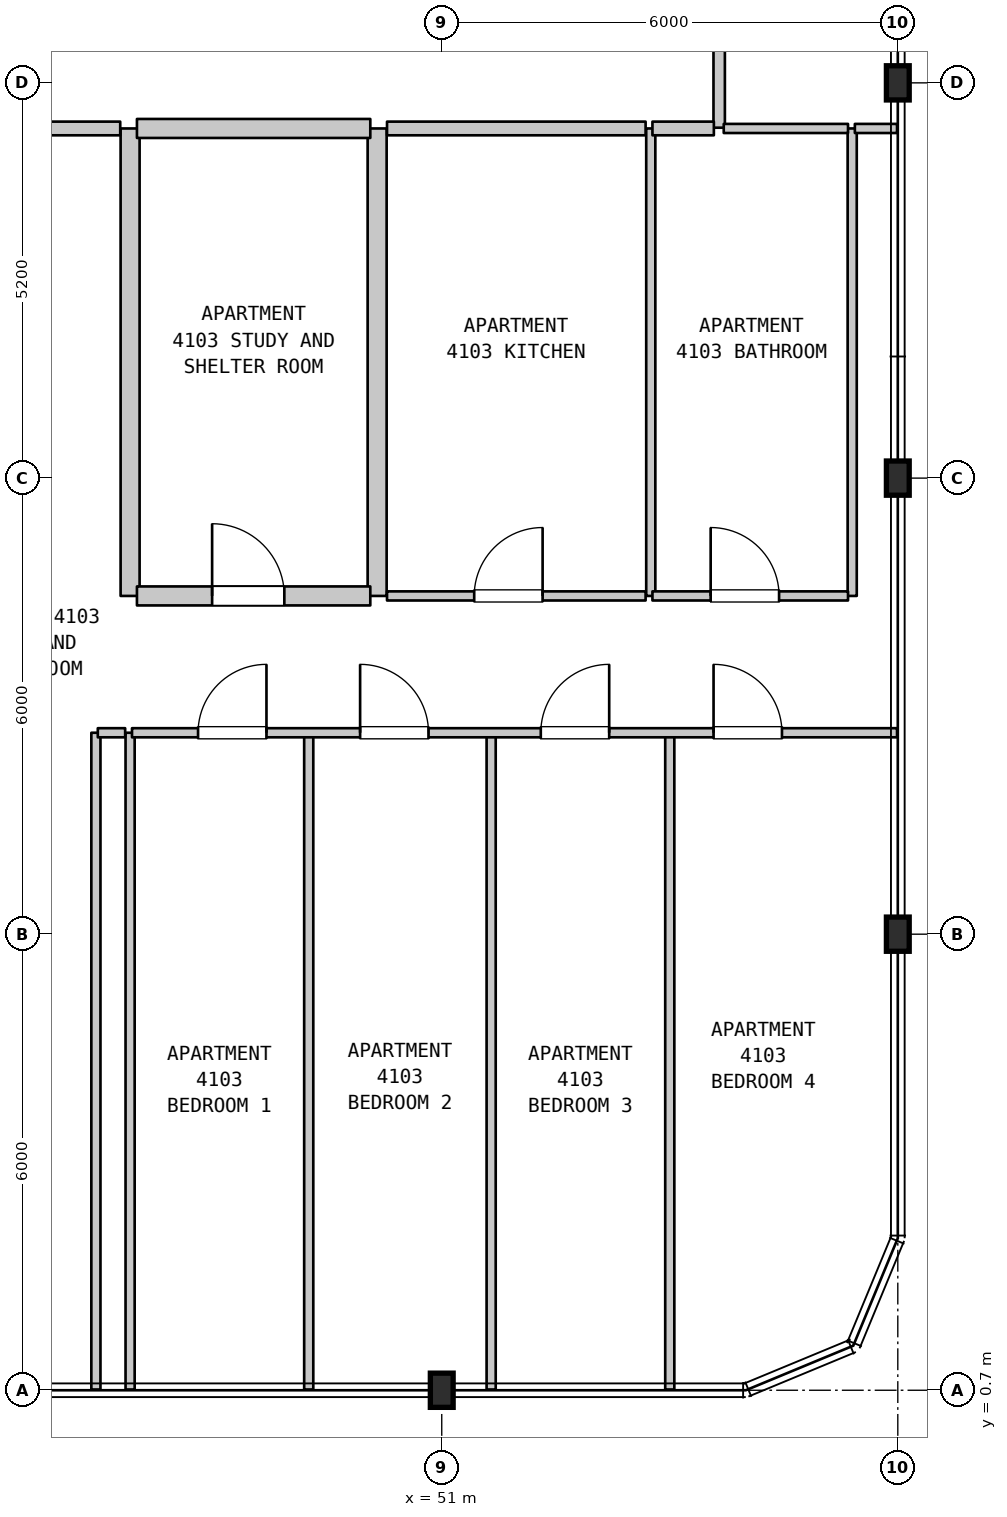
"""IFC4 building model, lengths in metres.
Left out: names, types, materials, properties, quantities, classifications, styles, units other than length and angle.
Written with IfcOpenShell. Run it as: python <this file> out.ifc"""

import sys

from ifc_helpers import new_model, si_unit, direction, frame, frame_2d, origin, origin_2d, place, context, subcontext, project, spatial, rectangle, i_section, extrude, element, fill, save


model = new_model("IFC4")
c1 = context("Model", 3, precision=1e-05, world=origin(), true_north=direction((0.0, 1.0)))
c2 = subcontext(c1, "Body", "Model", "MODEL_VIEW")
j1 = project(units=[si_unit("LENGTHUNIT", "METRE"), si_unit("PLANEANGLEUNIT", "RADIAN")], contexts=[c1])
p1 = place(None, origin())
s1 = spatial("IfcSite", under=j1, at=p1, CompositionType="ELEMENT")
p2 = place(p1, origin())
s2 = spatial("IfcBuilding", under=s1, at=p2, CompositionType="ELEMENT")
p3 = place(p2, frame((0.0, 0.0, 169.1)))
s3 = spatial("IfcBuildingStorey", under=s2, at=p3, CompositionType="ELEMENT", Elevation=169.1)
for number, where, z_axis, x_axis in (
    (1, (51.0, 0.7, 0.0), (0.0, 0.0, 1.0), (1.0, 0.0, 0.0)),
    (2, (57.0, 6.7, 0.0), (0.0, 0.0, 1.0), (1.0, 0.0, 0.0)),
    (3, (57.0, 12.7, 0.0), (0.0, 0.0, 1.0), (1.0, 0.0, 0.0)),
    (4, (57.0, 17.9, 0.0), (0.0, 0.0, 1.0), (1.0, 0.0, 0.0)),
):
    element("IfcColumn", number, at=place(p3, frame(where, z_axis=z_axis, x_axis=x_axis)), inside=s3, PredefinedType="COLUMN", context=c2, shape_type="SweptSolid", body=[
        extrude(i_section(OverallWidth=0.3, OverallDepth=0.45, WebThickness=0.014, FlangeThickness=0.026, FilletRadius=0.027, at=origin_2d()), origin(), (0.0, 0.0, 1.0), 3.7),
    ])
for number, where, z_axis, x_axis in (
    (5, (46.45, 0.71, 0.0), (0.0, 0.0, 1.0), (0.0, 1.0, 0.0)),
    (6, (46.9, 0.71, 0.0), (0.0, 0.0, 1.0), (0.0, 1.0, 0.0)),
):
    element("IfcWall", number, at=place(p3, frame(where, z_axis=z_axis, x_axis=x_axis)), inside=s3, PredefinedType="PARTITIONING", context=c2, shape_type="SweptSolid", body=[
        extrude(rectangle(XDim=8.64, YDim=0.12, at=frame_2d((4.32, 0.0))), origin(), (0.0, 0.0, 1.0), 3.39),
    ])
p4 = place(p3, frame((46.9, 11.15, 0.0), z_axis=(0.0, 0.0, 1.0), x_axis=(0.0, 1.0, 0.0)))
e7 = element("IfcWall", 7, at=p4, inside=s3, PredefinedType="STANDARD", context=c2, shape_type="SweptSolid", body=[
    extrude(rectangle(XDim=6.15, YDim=0.25, at=frame_2d((3.075, 0.0))), origin(), (0.0, 0.0, 1.0), 3.39),
])
p5 = place(p3, frame((49.25, 0.71, 0.0), z_axis=(0.0, 0.0, 1.0), x_axis=(0.0, 1.0, 0.0)))
e8 = element("IfcWall", 8, at=p5, inside=s3, PredefinedType="PARTITIONING", context=c2, shape_type="SweptSolid", body=[
    extrude(rectangle(XDim=8.64, YDim=0.12, at=frame_2d((4.32, 0.0))), origin(), (0.0, 0.0, 1.0), 3.39),
])
p6 = place(p3, frame((50.15, 11.15, 0.0), z_axis=(0.0, 0.0, 1.0), x_axis=(0.0, 1.0, 0.0)))
e9 = element("IfcWall", 9, at=p6, inside=s3, PredefinedType="STANDARD", context=c2, shape_type="SweptSolid", body=[
    extrude(rectangle(XDim=6.15, YDim=0.25, at=frame_2d((3.075, 0.0))), origin(), (0.0, 0.0, 1.0), 3.39),
])
p7 = place(p3, frame((51.65, 0.71, 0.0), z_axis=(0.0, 0.0, 1.0), x_axis=(0.0, 1.0, 0.0)))
e10 = element("IfcWall", 10, at=p7, inside=s3, PredefinedType="PARTITIONING", context=c2, shape_type="SweptSolid", body=[
    extrude(rectangle(XDim=8.64, YDim=0.12, at=frame_2d((4.32, 0.0))), origin(), (0.0, 0.0, 1.0), 3.39),
])
p8 = place(p3, frame((53.75, 11.15, 0.0), z_axis=(0.0, 0.0, 1.0), x_axis=(0.0, 1.0, 0.0)))
e11 = element("IfcWall", 11, at=p8, inside=s3, PredefinedType="PARTITIONING", context=c2, shape_type="SweptSolid", body=[
    extrude(rectangle(XDim=6.15, YDim=0.12, at=frame_2d((3.075, 0.0))), origin(), (0.0, 0.0, 1.0), 3.39),
])
p9 = place(p3, frame((54.0, 0.71, 0.0), z_axis=(0.0, 0.0, 1.0), x_axis=(0.0, 1.0, 0.0)))
e12 = element("IfcWall", 12, at=p9, inside=s3, PredefinedType="PARTITIONING", context=c2, shape_type="SweptSolid", body=[
    extrude(rectangle(XDim=8.64, YDim=0.12, at=frame_2d((4.32, 0.0))), origin(), (0.0, 0.0, 1.0), 3.39),
])
p10 = place(p3, frame((54.65, 17.31, 0.0), z_axis=(0.0, 0.0, 1.0), x_axis=(0.0, 1.0, 0.0)))
e13 = element("IfcWall", 13, at=p10, inside=s3, PredefinedType="STANDARD", context=c2, shape_type="SweptSolid", body=[
    extrude(rectangle(XDim=2.19, YDim=0.15, at=frame_2d((1.095, 0.0))), origin(), (0.0, 0.0, 1.0), 3.39),
])
p11 = place(p3, frame((56.4, 11.15, 0.0), z_axis=(0.0, 0.0, 1.0), x_axis=(0.0, 1.0, 0.0)))
e14 = element("IfcWall", 14, at=p11, inside=s3, PredefinedType="PARTITIONING", context=c2, shape_type="SweptSolid", body=[
    extrude(rectangle(XDim=6.15, YDim=0.12, at=frame_2d((3.075, 0.0))), origin(), (0.0, 0.0, 1.0), 3.39),
])
p12 = place(p3, frame((46.475, 9.35, 0.0), z_axis=(0.0, 0.0, 1.0), x_axis=(1.0, 0.0, 0.0)))
e15 = element("IfcWall", 15, at=p12, inside=s3, PredefinedType="PARTITIONING", context=c2, shape_type="SweptSolid", body=[
    extrude(rectangle(XDim=0.36, YDim=0.12, at=frame_2d((0.18, 0.0))), origin(), (0.0, 0.0, 1.0), 3.39),
])
p13 = place(p3, frame((46.925, 9.35, 0.0), z_axis=(0.0, 0.0, 1.0), x_axis=(1.0, 0.0, 0.0)))
e16 = element("IfcWall", 16, at=p13, inside=s3, PredefinedType="PARTITIONING", context=c2, shape_type="SweptSolid", body=[
    extrude(rectangle(XDim=10.065, YDim=0.12, at=frame_2d((5.032, 0.0))), origin(), (0.0, 0.0, 1.0), 3.39),
])
p14 = place(p13, frame((0.869, 0.0, 0.0)))
e17 = element("IfcOpeningElement", 17, at=p14, cuts=e16, PredefinedType="OPENING", context=c2, shape_type="SweptSolid", body=[
    extrude(rectangle(XDim=0.9, YDim=2.15, at=frame_2d((0.45, 1.075))), frame((0.0, 0.07, 0.0), z_axis=(0.0, -1.0, 0.0), x_axis=(1.0, 0.0, 0.0)), (0.0, 0.0, 1.0), 0.14),
])
p15 = place(p13, frame((3.001, 0.0, 0.0)))
e18 = element("IfcOpeningElement", 18, at=p15, cuts=e16, PredefinedType="OPENING", context=c2, shape_type="SweptSolid", body=[
    extrude(rectangle(XDim=0.9, YDim=2.15, at=frame_2d((0.45, 1.075))), frame((0.0, 0.07, 0.0), z_axis=(0.0, -1.0, 0.0), x_axis=(1.0, 0.0, 0.0)), (0.0, 0.0, 1.0), 0.14),
])
p16 = place(p13, frame((5.378, 0.0, 0.0)))
e19 = element("IfcOpeningElement", 19, at=p16, cuts=e16, PredefinedType="OPENING", context=c2, shape_type="SweptSolid", body=[
    extrude(rectangle(XDim=0.9, YDim=2.15, at=frame_2d((0.45, 1.075))), frame((0.0, 0.07, 0.0), z_axis=(0.0, -1.0, 0.0), x_axis=(1.0, 0.0, 0.0)), (0.0, 0.0, 1.0), 0.14),
])
p17 = place(p13, frame((7.651, 0.0, 0.0)))
e20 = element("IfcOpeningElement", 20, at=p17, cuts=e16, PredefinedType="OPENING", context=c2, shape_type="SweptSolid", body=[
    extrude(rectangle(XDim=0.9, YDim=2.15, at=frame_2d((0.45, 1.075))), frame((0.0, 0.07, 0.0), z_axis=(0.0, -1.0, 0.0), x_axis=(1.0, 0.0, 0.0)), (0.0, 0.0, 1.0), 0.14),
])
p18 = place(p3, frame((46.99, 11.15, 0.0), z_axis=(0.0, 0.0, 1.0), x_axis=(1.0, 0.0, 0.0)))
e21 = element("IfcWall", 21, at=p18, inside=s3, PredefinedType="STANDARD", context=c2, shape_type="SweptSolid", body=[
    extrude(rectangle(XDim=3.07, YDim=0.25, at=frame_2d((1.535, 0.0))), origin(), (0.0, 0.0, 1.0), 3.39),
])
p19 = place(p18, frame((0.989, 0.0, 0.0)))
e22 = element("IfcOpeningElement", 22, at=p19, cuts=e21, PredefinedType="OPENING", context=c2, shape_type="SweptSolid", body=[
    extrude(rectangle(XDim=0.95, YDim=2.15, at=frame_2d((0.475, 1.075))), frame((0.0, 0.135, 0.0), z_axis=(0.0, -1.0, 0.0), x_axis=(1.0, 0.0, 0.0)), (0.0, 0.0, 1.0), 0.27),
])
p20 = place(p3, frame((50.28, 11.15, 0.0), z_axis=(0.0, 0.0, 1.0), x_axis=(1.0, 0.0, 0.0)))
e23 = element("IfcWall", 23, at=p20, inside=s3, PredefinedType="PARTITIONING", context=c2, shape_type="SweptSolid", body=[
    extrude(rectangle(XDim=3.402, YDim=0.12, at=frame_2d((1.701, 0.0))), origin(), (0.0, 0.0, 1.0), 3.39),
])
p21 = place(p20, frame((1.147, 0.0, 0.0)))
e24 = element("IfcOpeningElement", 24, at=p21, cuts=e23, PredefinedType="OPENING", context=c2, shape_type="SweptSolid", body=[
    extrude(rectangle(XDim=0.9, YDim=2.15, at=frame_2d((0.45, 1.075))), frame((0.0, 0.07, 0.0), z_axis=(0.0, -1.0, 0.0), x_axis=(1.0, 0.0, 0.0)), (0.0, 0.0, 1.0), 0.14),
])
p22 = place(p3, frame((53.772, 11.15, 0.0), z_axis=(0.0, 0.0, 1.0), x_axis=(1.0, 0.0, 0.0)))
e25 = element("IfcWall", 25, at=p22, inside=s3, PredefinedType="PARTITIONING", context=c2, shape_type="SweptSolid", body=[
    extrude(rectangle(XDim=2.573, YDim=0.12, at=frame_2d((1.287, 0.0))), origin(), (0.0, 0.0, 1.0), 3.39),
])
p23 = place(p22, frame((0.766, 0.0, 0.0)))
e26 = element("IfcOpeningElement", 26, at=p23, cuts=e25, PredefinedType="OPENING", context=c2, shape_type="SweptSolid", body=[
    extrude(rectangle(XDim=0.9, YDim=2.1, at=frame_2d((0.45, 1.05))), frame((0.0, 0.07, 0.0), z_axis=(0.0, -1.0, 0.0), x_axis=(1.0, 0.0, 0.0)), (0.0, 0.0, 1.0), 0.14),
])
p24 = place(p3, frame((41.225, 17.3, 0.0), z_axis=(0.0, 0.0, 1.0), x_axis=(1.0, 0.0, 0.0)))
e27 = element("IfcWall", 27, at=p24, inside=s3, PredefinedType="STANDARD", context=c2, shape_type="SweptSolid", body=[
    extrude(rectangle(XDim=5.545, YDim=0.18, at=frame_2d((2.772, 0.0))), origin(), (0.0, 0.0, 1.0), 3.39),
])
p25 = place(p24, frame((2.305, 0.0, 0.0)))
e28 = element("IfcOpeningElement", 28, at=p25, cuts=e27, PredefinedType="OPENING", context=c2, shape_type="SweptSolid", body=[
    extrude(rectangle(XDim=1.0, YDim=2.15, at=frame_2d((0.5, 1.075))), frame((0.0, 0.1, 0.0), z_axis=(0.0, -1.0, 0.0), x_axis=(1.0, 0.0, 0.0)), (0.0, 0.0, 1.0), 0.2),
])
p26 = place(p3, frame((46.99, 17.3, 0.0), z_axis=(0.0, 0.0, 1.0), x_axis=(1.0, 0.0, 0.0)))
e29 = element("IfcWall", 29, at=p26, inside=s3, PredefinedType="STANDARD", context=c2, shape_type="SweptSolid", body=[
    extrude(rectangle(XDim=3.07, YDim=0.25, at=frame_2d((1.535, 0.0))), origin(), (0.0, 0.0, 1.0), 3.39),
])
p27 = place(p3, frame((50.28, 17.3, 0.0), z_axis=(0.0, 0.0, 1.0), x_axis=(1.0, 0.0, 0.0)))
e30 = element("IfcWall", 30, at=p27, inside=s3, PredefinedType="STANDARD", context=c2, shape_type="SweptSolid", body=[
    extrude(rectangle(XDim=3.402, YDim=0.18, at=frame_2d((1.701, 0.0))), origin(), (0.0, 0.0, 1.0), 3.39),
])
p28 = place(p3, frame((53.772, 17.3, 0.0), z_axis=(0.0, 0.0, 1.0), x_axis=(1.0, 0.0, 0.0)))
e31 = element("IfcWall", 31, at=p28, inside=s3, PredefinedType="STANDARD", context=c2, shape_type="SweptSolid", body=[
    extrude(rectangle(XDim=0.808, YDim=0.18, at=frame_2d((0.404, 0.0))), origin(), (0.0, 0.0, 1.0), 3.39),
])
p29 = place(p3, frame((54.71, 17.3, 0.0), z_axis=(0.0, 0.0, 1.0), x_axis=(1.0, 0.0, 0.0)))
e32 = element("IfcWall", 32, at=p29, inside=s3, PredefinedType="PARTITIONING", context=c2, shape_type="SweptSolid", body=[
    extrude(rectangle(XDim=1.635, YDim=0.12, at=frame_2d((0.817, 0.0))), origin(), (0.0, 0.0, 1.0), 3.39),
])
p30 = place(p3, frame((56.435, 17.3, 0.0), z_axis=(0.0, 0.0, 1.0), x_axis=(1.0, 0.0, 0.0)))
e33 = element("IfcWall", 33, at=p30, inside=s3, PredefinedType="PARTITIONING", context=c2, shape_type="SweptSolid", body=[
    extrude(rectangle(XDim=0.555, YDim=0.12, at=frame_2d((0.277, 0.0))), origin(), (0.0, 0.0, 1.0), 3.39),
])
p31 = place(p14, origin())
e34 = element("IfcDoor", 34, at=p31, inside=s3, OperationType="SINGLE_SWING_RIGHT", PredefinedType="DOOR", context=c2, shape_type="SweptSolid", body=[
    extrude(rectangle(XDim=0.9, YDim=2.15, at=frame_2d((0.45, 1.075))), frame((0.0, 0.025, 0.0), z_axis=(0.0, -1.0, 0.0), x_axis=(1.0, 0.0, 0.0)), (0.0, 0.0, 1.0), 0.05),
])
fill(e17, e34)
p32 = place(p15, origin())
e35 = element("IfcDoor", 35, at=p32, inside=s3, OperationType="SINGLE_SWING_LEFT", PredefinedType="DOOR", context=c2, shape_type="SweptSolid", body=[
    extrude(rectangle(XDim=0.9, YDim=2.15, at=frame_2d((0.45, 1.075))), frame((0.0, 0.025, 0.0), z_axis=(0.0, -1.0, 0.0), x_axis=(1.0, 0.0, 0.0)), (0.0, 0.0, 1.0), 0.05),
])
fill(e18, e35)
p33 = place(p16, origin())
e36 = element("IfcDoor", 36, at=p33, inside=s3, OperationType="SINGLE_SWING_RIGHT", PredefinedType="DOOR", context=c2, shape_type="SweptSolid", body=[
    extrude(rectangle(XDim=0.9, YDim=2.15, at=frame_2d((0.45, 1.075))), frame((0.0, 0.025, 0.0), z_axis=(0.0, -1.0, 0.0), x_axis=(1.0, 0.0, 0.0)), (0.0, 0.0, 1.0), 0.05),
])
fill(e19, e36)
p34 = place(p17, origin())
e37 = element("IfcDoor", 37, at=p34, inside=s3, OperationType="SINGLE_SWING_LEFT", PredefinedType="DOOR", context=c2, shape_type="SweptSolid", body=[
    extrude(rectangle(XDim=0.9, YDim=2.15, at=frame_2d((0.45, 1.075))), frame((0.0, 0.025, 0.0), z_axis=(0.0, -1.0, 0.0), x_axis=(1.0, 0.0, 0.0)), (0.0, 0.0, 1.0), 0.05),
])
fill(e20, e37)
p35 = place(p19, origin())
e38 = element("IfcDoor", 38, at=p35, inside=s3, OperationType="SINGLE_SWING_LEFT", PredefinedType="DOOR", context=c2, shape_type="SweptSolid", body=[
    extrude(rectangle(XDim=0.95, YDim=2.15, at=frame_2d((0.475, 1.075))), frame((0.0, 0.025, 0.0), z_axis=(0.0, -1.0, 0.0), x_axis=(1.0, 0.0, 0.0)), (0.0, 0.0, 1.0), 0.05),
])
fill(e22, e38)
p36 = place(p21, origin())
e39 = element("IfcDoor", 39, at=p36, inside=s3, OperationType="SINGLE_SWING_RIGHT", PredefinedType="DOOR", context=c2, shape_type="SweptSolid", body=[
    extrude(rectangle(XDim=0.9, YDim=2.15, at=frame_2d((0.45, 1.075))), frame((0.0, 0.025, 0.0), z_axis=(0.0, -1.0, 0.0), x_axis=(1.0, 0.0, 0.0)), (0.0, 0.0, 1.0), 0.05),
])
fill(e24, e39)
p37 = place(p23, origin())
e40 = element("IfcDoor", 40, at=p37, inside=s3, OperationType="SINGLE_SWING_LEFT", PredefinedType="DOOR", context=c2, shape_type="SweptSolid", body=[
    extrude(rectangle(XDim=0.9, YDim=2.1, at=frame_2d((0.45, 1.05))), frame((0.0, 0.025, 0.0), z_axis=(0.0, -1.0, 0.0), x_axis=(1.0, 0.0, 0.0)), (0.0, 0.0, 1.0), 0.05),
])
fill(e26, e40)
save(model, sys.argv[1])
